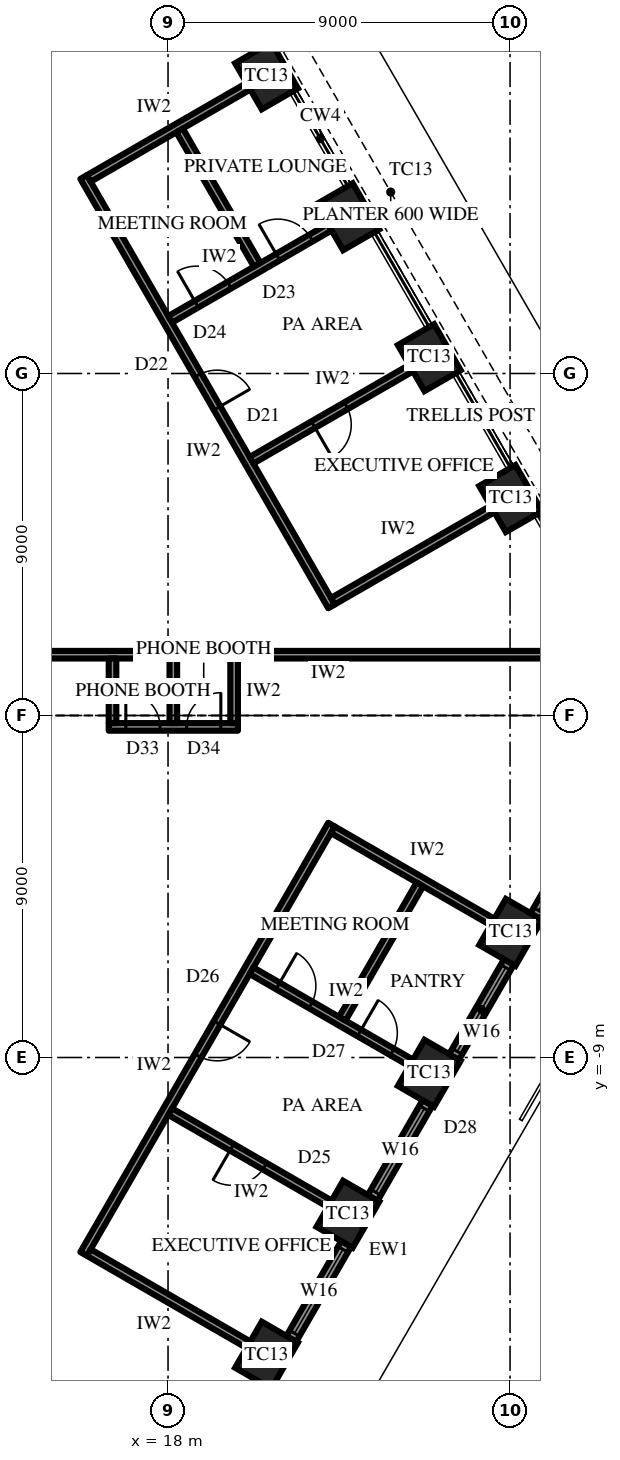
"""IFC4 building model, lengths in metres.
Left out: names, types, materials, properties, quantities, classifications, styles, units other than length and angle.
Written with IfcOpenShell. Run it as: python <this file> out.ifc"""

import sys

from ifc_helpers import new_model, si_unit, direction, frame, frame_2d, origin, origin_2d, place, context, subcontext, project, spatial, rectangle, extrude, element, fill, save


model = new_model("IFC4")
c1 = context("Model", 3, precision=1e-05, world=origin(), true_north=direction((0.0, 1.0)))
c2 = subcontext(c1, "Body", "Model", "MODEL_VIEW")
j1 = project(units=[si_unit("LENGTHUNIT", "METRE"), si_unit("PLANEANGLEUNIT", "RADIAN")], contexts=[c1])
p1 = place(None, origin())
s1 = spatial("IfcSite", under=j1, at=p1, CompositionType="ELEMENT")
p2 = place(p1, origin())
s2 = spatial("IfcBuilding", under=s1, at=p2, CompositionType="ELEMENT")
p3 = place(p2, frame((0.0, 0.0, 324.1)))
s3 = spatial("IfcBuildingStorey", under=s2, at=p3, CompositionType="ELEMENT", Elevation=324.1)
for number, where, z_axis, x_axis in (
    (1, (27.015, 5.708, 0.0), (0.0, 0.0, 1.0), (-0.5, 0.866, 0.0)),
    (2, (24.874, 9.417, 0.0), (0.0, 0.0, 1.0), (-0.5, 0.866, 0.0)),
    (3, (22.733, 13.125, 0.0), (0.0, 0.0, 1.0), (-0.5, 0.866, 0.0)),
    (4, (20.592, 16.833, 0.0), (0.0, 0.0, 1.0), (-0.5, 0.866, 0.0)),
    (5, (20.592, -16.833, 0.0), (0.0, 0.0, 1.0), (0.5, 0.866, 0.0)),
    (6, (22.733, -13.125, 0.0), (0.0, 0.0, 1.0), (0.5, 0.866, 0.0)),
    (7, (24.874, -9.417, 0.0), (0.0, 0.0, 1.0), (0.5, 0.866, 0.0)),
    (8, (27.015, -5.708, 0.0), (0.0, 0.0, 1.0), (0.5, 0.866, 0.0)),
):
    element("IfcColumn", number, at=place(p3, frame(where, z_axis=z_axis, x_axis=x_axis)), inside=s3, PredefinedType="COLUMN", context=c2, shape_type="SweptSolid", body=[
        extrude(rectangle(XDim=1.4, YDim=1.1, at=origin_2d()), origin(), (0.0, 0.0, 1.0), 4.2),
    ])
p4 = place(p3, frame((16.613, -24.425, 0.0), z_axis=(0.0, 0.0, 1.0), x_axis=(0.499997191038, 0.866027025533, 0.0)))
e9 = element("IfcWall", 9, at=p4, inside=s3, PredefinedType="SOLIDWALL", context=c2, shape_type="SweptSolid", body=[
    extrude(rectangle(XDim=25.692, YDim=0.3, at=frame_2d((12.846, 0.0))), origin(), (0.0, 0.0, 1.0), 2.0),
])
p5 = place(p4, frame((0.866, 0.0, 0.6)))
e10 = element("IfcOpeningElement", 10, at=p5, cuts=e9, PredefinedType="OPENING", context=c2, shape_type="SweptSolid", body=[
    extrude(rectangle(XDim=2.55, YDim=1.15, at=frame_2d((1.275, 0.575))), frame((0.0, 0.16, 0.0), z_axis=(0.0, -1.0, 0.0), x_axis=(1.0, 0.0, 0.0)), (0.0, 0.0, 1.0), 0.32),
])
p6 = place(p4, frame((5.148, 0.0, 0.6)))
e11 = element("IfcOpeningElement", 11, at=p6, cuts=e9, PredefinedType="OPENING", context=c2, shape_type="SweptSolid", body=[
    extrude(rectangle(XDim=2.55, YDim=1.15, at=frame_2d((1.275, 0.575))), frame((0.0, 0.16, 0.0), z_axis=(0.0, -1.0, 0.0), x_axis=(1.0, 0.0, 0.0)), (0.0, 0.0, 1.0), 0.32),
])
p7 = place(p4, frame((9.43, 0.0, 0.6)))
e12 = element("IfcOpeningElement", 12, at=p7, cuts=e9, PredefinedType="OPENING", context=c2, shape_type="SweptSolid", body=[
    extrude(rectangle(XDim=2.55, YDim=1.15, at=frame_2d((1.275, 0.575))), frame((0.0, 0.16, 0.0), z_axis=(0.0, -1.0, 0.0), x_axis=(1.0, 0.0, 0.0)), (0.0, 0.0, 1.0), 0.32),
])
p8 = place(p4, frame((13.712, 0.0, 0.6)))
e13 = element("IfcOpeningElement", 13, at=p8, cuts=e9, PredefinedType="OPENING", context=c2, shape_type="SweptSolid", body=[
    extrude(rectangle(XDim=2.55, YDim=1.15, at=frame_2d((1.275, 0.575))), frame((0.0, 0.16, 0.0), z_axis=(0.0, -1.0, 0.0), x_axis=(1.0, 0.0, 0.0)), (0.0, 0.0, 1.0), 0.32),
])
p9 = place(p4, frame((17.994, 0.0, 0.6)))
e14 = element("IfcOpeningElement", 14, at=p9, cuts=e9, PredefinedType="OPENING", context=c2, shape_type="SweptSolid", body=[
    extrude(rectangle(XDim=2.55, YDim=1.15, at=frame_2d((1.275, 0.575))), frame((0.0, 0.16, 0.0), z_axis=(0.0, -1.0, 0.0), x_axis=(1.0, 0.0, 0.0)), (0.0, 0.0, 1.0), 0.32),
])
p10 = place(p4, frame((22.276, 0.0, 0.6)))
e15 = element("IfcOpeningElement", 15, at=p10, cuts=e9, PredefinedType="OPENING", context=c2, shape_type="SweptSolid", body=[
    extrude(rectangle(XDim=2.55, YDim=1.15, at=frame_2d((1.275, 0.575))), frame((0.0, 0.16, 0.0), z_axis=(0.0, -1.0, 0.0), x_axis=(1.0, 0.0, 0.0)), (0.0, 0.0, 1.0), 0.32),
])
p11 = place(p3, frame((22.302, 2.872, 0.0), z_axis=(0.0, 0.0, 1.0), x_axis=(-0.499999460936, 0.866025715013, 0.0)))
e16 = element("IfcWall", 16, at=p11, inside=s3, PredefinedType="PARTITIONING", context=c2, shape_type="SweptSolid", body=[
    extrude(rectangle(XDim=13.046, YDim=0.2, at=frame_2d((6.523, 0.0))), origin(), (0.0, 0.0, 1.0), 4.0),
])
p12 = place(p11, frame((6.023, 0.0, 0.0)))
e17 = element("IfcOpeningElement", 17, at=p12, cuts=e16, PredefinedType="OPENING", context=c2, shape_type="SweptSolid", body=[
    extrude(rectangle(XDim=1.0, YDim=2.2, at=frame_2d((0.5, 1.1))), frame((0.0, 0.11, 0.0), z_axis=(0.0, -1.0, 0.0), x_axis=(1.0, 0.0, 0.0)), (0.0, 0.0, 1.0), 0.22),
])
p13 = place(p3, frame((22.339, 3.008, 0.0), z_axis=(0.0, 0.0, 1.0), x_axis=(0.866019606374, 0.500010041276, 0.0)))
e18 = element("IfcWall", 18, at=p13, inside=s3, PredefinedType="PARTITIONING", context=c2, shape_type="SweptSolid", body=[
    extrude(rectangle(XDim=4.85, YDim=0.2, at=frame_2d((2.425, 0.0))), origin(), (0.0, 0.0, 1.0), 3.082),
])
p14 = place(p3, frame((20.198, 6.717, 0.0), z_axis=(0.0, 0.0, 1.0), x_axis=(0.866019606374, 0.500010041276, 0.0)))
e19 = element("IfcWall", 19, at=p14, inside=s3, PredefinedType="PARTITIONING", context=c2, shape_type="SweptSolid", body=[
    extrude(rectangle(XDim=4.85, YDim=0.2, at=frame_2d((2.425, 0.0))), origin(), (0.0, 0.0, 1.0), 2.992),
])
p15 = place(p14, frame((1.875, 0.0, 0.0)))
e20 = element("IfcOpeningElement", 20, at=p15, cuts=e19, PredefinedType="OPENING", context=c2, shape_type="SweptSolid", body=[
    extrude(rectangle(XDim=1.0, YDim=2.2, at=frame_2d((0.5, 1.1))), frame((0.0, 0.11, 0.0), z_axis=(0.0, -1.0, 0.0), x_axis=(1.0, 0.0, 0.0)), (0.0, 0.0, 1.0), 0.22),
])
p16 = place(p3, frame((18.057, 10.425, 0.0), z_axis=(0.0, 0.0, 1.0), x_axis=(0.866019606374, 0.500010041276, 0.0)))
e21 = element("IfcWall", 21, at=p16, inside=s3, PredefinedType="PARTITIONING", context=c2, shape_type="SweptSolid", body=[
    extrude(rectangle(XDim=4.85, YDim=0.2, at=frame_2d((2.425, 0.0))), origin(), (0.0, 0.0, 1.0), 3.082),
])
p17 = place(p16, frame((0.8, 0.0, 0.0)))
e22 = element("IfcOpeningElement", 22, at=p17, cuts=e21, PredefinedType="OPENING", context=c2, shape_type="SweptSolid", body=[
    extrude(rectangle(XDim=1.0, YDim=2.2, at=frame_2d((0.5, 1.1))), frame((0.0, 0.11, 0.0), z_axis=(0.0, -1.0, 0.0), x_axis=(1.0, 0.0, 0.0)), (0.0, 0.0, 1.0), 0.22),
])
p18 = place(p16, frame((3.275, 0.0, 0.0)))
e23 = element("IfcOpeningElement", 23, at=p18, cuts=e21, PredefinedType="OPENING", context=c2, shape_type="SweptSolid", body=[
    extrude(rectangle(XDim=1.0, YDim=2.2, at=frame_2d((0.5, 1.1))), frame((0.0, 0.11, 0.0), z_axis=(0.0, -1.0, 0.0), x_axis=(1.0, 0.0, 0.0)), (0.0, 0.0, 1.0), 0.22),
])
p19 = place(p3, frame((15.916, 14.133, 0.0), z_axis=(0.0, 0.0, 1.0), x_axis=(0.866032190624, 0.499988244665, 0.0)))
e24 = element("IfcWall", 24, at=p19, inside=s3, PredefinedType="PARTITIONING", context=c2, shape_type="SweptSolid", body=[
    extrude(rectangle(XDim=4.85, YDim=0.2, at=frame_2d((2.425, 0.0))), origin(), (0.0, 0.0, 1.0), 3.082),
])
p20 = place(p3, frame((20.345, 11.862, 0.0), z_axis=(0.0, 0.0, 1.0), x_axis=(-0.499998569178, 0.866026229868, 0.0)))
e25 = element("IfcWall", 25, at=p20, inside=s3, PredefinedType="PARTITIONING", context=c2, shape_type="SweptSolid", body=[
    extrude(rectangle(XDim=4.082, YDim=0.2, at=frame_2d((2.041, 0.0))), origin(), (0.0, 0.0, 1.0), 4.0),
])
p21 = place(p3, frame((15.779, -14.17, 0.0), z_axis=(0.0, 0.0, 1.0), x_axis=(0.499999460936, 0.866025715013, 0.0)))
e26 = element("IfcWall", 26, at=p21, inside=s3, PredefinedType="PARTITIONING", context=c2, shape_type="SweptSolid", body=[
    extrude(rectangle(XDim=13.046, YDim=0.2, at=frame_2d((6.523, 0.0))), origin(), (0.0, 0.0, 1.0), 4.0),
])
p22 = place(p21, frame((6.023, 0.0, 0.0)))
e27 = element("IfcOpeningElement", 27, at=p22, cuts=e26, PredefinedType="OPENING", context=c2, shape_type="SweptSolid", body=[
    extrude(rectangle(XDim=1.0, YDim=2.2, at=frame_2d((0.5, 1.1))), frame((0.0, 0.11, 0.0), z_axis=(0.0, -1.0, 0.0), x_axis=(1.0, 0.0, 0.0)), (0.0, 0.0, 1.0), 0.22),
])
p23 = place(p3, frame((15.916, -14.133, 0.0), z_axis=(0.0, 0.0, 1.0), x_axis=(0.866032190624, -0.499988244665, 0.0)))
e28 = element("IfcWall", 28, at=p23, inside=s3, PredefinedType="PARTITIONING", context=c2, shape_type="SweptSolid", body=[
    extrude(rectangle(XDim=4.85, YDim=0.2, at=frame_2d((2.425, 0.0))), origin(), (0.0, 0.0, 1.0), 3.082),
])
p24 = place(p3, frame((18.057, -10.425, 0.0), z_axis=(0.0, 0.0, 1.0), x_axis=(0.866019606374, -0.500010041276, 0.0)))
e29 = element("IfcWall", 29, at=p24, inside=s3, PredefinedType="PARTITIONING", context=c2, shape_type="SweptSolid", body=[
    extrude(rectangle(XDim=4.85, YDim=0.2, at=frame_2d((2.425, 0.0))), origin(), (0.0, 0.0, 1.0), 3.082),
])
p25 = place(p24, frame((1.875, 0.0, 0.0)))
e30 = element("IfcOpeningElement", 30, at=p25, cuts=e29, PredefinedType="OPENING", context=c2, shape_type="SweptSolid", body=[
    extrude(rectangle(XDim=1.0, YDim=2.2, at=frame_2d((0.5, 1.1))), frame((0.0, 0.11, 0.0), z_axis=(0.0, -1.0, 0.0), x_axis=(1.0, 0.0, 0.0)), (0.0, 0.0, 1.0), 0.22),
])
p26 = place(p3, frame((20.198, -6.717, 0.0), z_axis=(0.0, 0.0, 1.0), x_axis=(0.866019606374, -0.500010041276, 0.0)))
e31 = element("IfcWall", 31, at=p26, inside=s3, PredefinedType="PARTITIONING", context=c2, shape_type="SweptSolid", body=[
    extrude(rectangle(XDim=4.85, YDim=0.2, at=frame_2d((2.425, 0.0))), origin(), (0.0, 0.0, 1.0), 2.992),
])
p27 = place(p26, frame((0.8, 0.0, 0.0)))
e32 = element("IfcOpeningElement", 32, at=p27, cuts=e31, PredefinedType="OPENING", context=c2, shape_type="SweptSolid", body=[
    extrude(rectangle(XDim=1.0, YDim=2.2, at=frame_2d((0.5, 1.1))), frame((0.0, 0.11, 0.0), z_axis=(0.0, -1.0, 0.0), x_axis=(1.0, 0.0, 0.0)), (0.0, 0.0, 1.0), 0.22),
])
p28 = place(p26, frame((3.275, 0.0, 0.0)))
e33 = element("IfcOpeningElement", 33, at=p28, cuts=e31, PredefinedType="OPENING", context=c2, shape_type="SweptSolid", body=[
    extrude(rectangle(XDim=1.0, YDim=2.2, at=frame_2d((0.5, 1.1))), frame((0.0, 0.11, 0.0), z_axis=(0.0, -1.0, 0.0), x_axis=(1.0, 0.0, 0.0)), (0.0, 0.0, 1.0), 0.22),
])
p29 = place(p3, frame((22.339, -3.008, 0.0), z_axis=(0.0, 0.0, 1.0), x_axis=(0.866019606374, -0.500010041276, 0.0)))
e34 = element("IfcWall", 34, at=p29, inside=s3, PredefinedType="PARTITIONING", context=c2, shape_type="SweptSolid", body=[
    extrude(rectangle(XDim=4.85, YDim=0.2, at=frame_2d((2.425, 0.0))), origin(), (0.0, 0.0, 1.0), 3.082),
])
p30 = place(p3, frame((22.586, -7.98, 0.0), z_axis=(0.0, 0.0, 1.0), x_axis=(0.499998569178, 0.866026229868, 0.0)))
e35 = element("IfcWall", 35, at=p30, inside=s3, PredefinedType="PARTITIONING", context=c2, shape_type="SweptSolid", body=[
    extrude(rectangle(XDim=4.082, YDim=0.2, at=frame_2d((2.041, 0.0))), origin(), (0.0, 0.0, 1.0), 4.0),
])
p31 = place(p3, frame((12.425, 1.6, 0.0), z_axis=(0.0, 0.0, 1.0), x_axis=(1.0, 0.0, 0.0)))
e36 = element("IfcWall", 36, at=p31, inside=s3, PredefinedType="PARTITIONING", context=c2, shape_type="SweptSolid", body=[
    extrude(rectangle(XDim=16.327, YDim=0.2, at=frame_2d((8.164, 0.0))), origin(), (0.0, 0.0, 1.0), 4.0),
])
p32 = place(p31, frame((1.133, 0.0, 0.0)))
e37 = element("IfcOpeningElement", 37, at=p32, cuts=e36, PredefinedType="OPENING", context=c2, shape_type="SweptSolid", body=[
    extrude(rectangle(XDim=1.0, YDim=2.2, at=frame_2d((0.5, 1.1))), frame((0.0, 0.11, 0.0), z_axis=(0.0, -1.0, 0.0), x_axis=(1.0, 0.0, 0.0)), (0.0, 0.0, 1.0), 0.22),
])
p33 = place(p3, frame((16.439, -0.3, 0.0), z_axis=(0.0, 0.0, 1.0), x_axis=(1.0, 0.0, 0.0)))
e38 = element("IfcWall", 38, at=p33, inside=s3, PredefinedType="PARTITIONING", context=c2, shape_type="SweptSolid", body=[
    extrude(rectangle(XDim=3.4, YDim=0.2, at=frame_2d((1.7, 0.0))), origin(), (0.0, 0.0, 1.0), 4.0),
])
p34 = place(p33, frame((0.45, 0.0, 0.0)))
e39 = element("IfcOpeningElement", 39, at=p34, cuts=e38, PredefinedType="OPENING", context=c2, shape_type="SweptSolid", body=[
    extrude(rectangle(XDim=0.9, YDim=2.2, at=frame_2d((0.45, 1.1))), frame((0.0, 0.11, 0.0), z_axis=(0.0, -1.0, 0.0), x_axis=(1.0, 0.0, 0.0)), (0.0, 0.0, 1.0), 0.22),
])
p35 = place(p33, frame((2.05, 0.0, 0.0)))
e40 = element("IfcOpeningElement", 40, at=p35, cuts=e38, PredefinedType="OPENING", context=c2, shape_type="SweptSolid", body=[
    extrude(rectangle(XDim=0.9, YDim=2.2, at=frame_2d((0.45, 1.1))), frame((0.0, 0.11, 0.0), z_axis=(0.0, -1.0, 0.0), x_axis=(1.0, 0.0, 0.0)), (0.0, 0.0, 1.0), 0.22),
])
for number, where, z_axis, x_axis in (
    (41, (16.54, 1.5, 0.0), (0.0, 0.0, 1.0), (0.0, -1.0, 0.0)),
    (42, (18.139, 1.5, 0.0), (0.0, 0.0, 1.0), (0.0, -1.0, 0.0)),
    (43, (19.74, 1.5, 0.0), (0.0, 0.0, 1.0), (0.0, -1.0, 0.0)),
):
    element("IfcWall", number, at=place(p3, frame(where, z_axis=z_axis, x_axis=x_axis)), inside=s3, PredefinedType="PARTITIONING", context=c2, shape_type="SweptSolid", body=[
        extrude(rectangle(XDim=1.7, YDim=0.2, at=frame_2d((0.85, 0.0))), origin(), (0.0, 0.0, 1.0), 4.0),
    ])
p36 = place(p7, origin())
e44 = element("IfcWindow", 44, at=p36, inside=s3, PartitioningType="SINGLE_PANEL", PredefinedType="WINDOW", context=c2, shape_type="SweptSolid", body=[
    extrude(rectangle(XDim=2.55, YDim=1.15, at=frame_2d((1.275, 0.575))), frame((0.0, 0.03, 0.0), z_axis=(0.0, -1.0, 0.0), x_axis=(1.0, 0.0, 0.0)), (0.0, 0.0, 1.0), 0.06),
])
fill(e12, e44)
p37 = place(p8, origin())
e45 = element("IfcWindow", 45, at=p37, inside=s3, PartitioningType="SINGLE_PANEL", PredefinedType="WINDOW", context=c2, shape_type="SweptSolid", body=[
    extrude(rectangle(XDim=2.55, YDim=1.15, at=frame_2d((1.275, 0.575))), frame((0.0, 0.03, 0.0), z_axis=(0.0, -1.0, 0.0), x_axis=(1.0, 0.0, 0.0)), (0.0, 0.0, 1.0), 0.06),
])
fill(e13, e45)
p38 = place(p9, origin())
e46 = element("IfcWindow", 46, at=p38, inside=s3, PartitioningType="SINGLE_PANEL", PredefinedType="WINDOW", context=c2, shape_type="SweptSolid", body=[
    extrude(rectangle(XDim=2.55, YDim=1.15, at=frame_2d((1.275, 0.575))), frame((0.0, 0.03, 0.0), z_axis=(0.0, -1.0, 0.0), x_axis=(1.0, 0.0, 0.0)), (0.0, 0.0, 1.0), 0.06),
])
fill(e14, e46)
p39 = place(p10, origin())
e47 = element("IfcWindow", 47, at=p39, inside=s3, PartitioningType="SINGLE_PANEL", PredefinedType="WINDOW", context=c2, shape_type="SweptSolid", body=[
    extrude(rectangle(XDim=2.55, YDim=1.15, at=frame_2d((1.275, 0.575))), frame((0.0, 0.03, 0.0), z_axis=(0.0, -1.0, 0.0), x_axis=(1.0, 0.0, 0.0)), (0.0, 0.0, 1.0), 0.06),
])
fill(e15, e47)
p40 = place(p15, frame((1.0, 0.0, 0.0), z_axis=(0.0, 0.0, 1.0), x_axis=(-1.0, 0.0, 0.0)))
e48 = element("IfcDoor", 48, at=p40, inside=s3, OperationType="SINGLE_SWING_LEFT", PredefinedType="DOOR", context=c2, shape_type="SweptSolid", body=[
    extrude(rectangle(XDim=1.0, YDim=2.2, at=frame_2d((0.5, 1.1))), frame((0.0, 0.025, 0.0), z_axis=(0.0, -1.0, 0.0), x_axis=(1.0, 0.0, 0.0)), (0.0, 0.0, 1.0), 0.05),
])
fill(e20, e48)
p41 = place(p12, frame((1.0, 0.0, 0.0), z_axis=(0.0, 0.0, 1.0), x_axis=(-1.0, 0.0, 0.0)))
e49 = element("IfcDoor", 49, at=p41, inside=s3, OperationType="SINGLE_SWING_LEFT", PredefinedType="DOOR", context=c2, shape_type="SweptSolid", body=[
    extrude(rectangle(XDim=1.0, YDim=2.2, at=frame_2d((0.5, 1.1))), frame((0.0, 0.025, 0.0), z_axis=(0.0, -1.0, 0.0), x_axis=(1.0, 0.0, 0.0)), (0.0, 0.0, 1.0), 0.05),
])
fill(e17, e49)
p42 = place(p17, origin())
e50 = element("IfcDoor", 50, at=p42, inside=s3, OperationType="SINGLE_SWING_RIGHT", PredefinedType="DOOR", context=c2, shape_type="SweptSolid", body=[
    extrude(rectangle(XDim=1.0, YDim=2.2, at=frame_2d((0.5, 1.1))), frame((0.0, 0.025, 0.0), z_axis=(0.0, -1.0, 0.0), x_axis=(1.0, 0.0, 0.0)), (0.0, 0.0, 1.0), 0.05),
])
fill(e22, e50)
p43 = place(p18, origin())
e51 = element("IfcDoor", 51, at=p43, inside=s3, OperationType="SINGLE_SWING_RIGHT", PredefinedType="DOOR", context=c2, shape_type="SweptSolid", body=[
    extrude(rectangle(XDim=1.0, YDim=2.2, at=frame_2d((0.5, 1.1))), frame((0.0, 0.025, 0.0), z_axis=(0.0, -1.0, 0.0), x_axis=(1.0, 0.0, 0.0)), (0.0, 0.0, 1.0), 0.05),
])
fill(e23, e51)
p44 = place(p25, frame((1.0, 0.0, 0.0), z_axis=(0.0, 0.0, 1.0), x_axis=(-1.0, 0.0, 0.0)))
e52 = element("IfcDoor", 52, at=p44, inside=s3, OperationType="SINGLE_SWING_LEFT", PredefinedType="DOOR", context=c2, shape_type="SweptSolid", body=[
    extrude(rectangle(XDim=1.0, YDim=2.2, at=frame_2d((0.5, 1.1))), frame((0.0, 0.025, 0.0), z_axis=(0.0, -1.0, 0.0), x_axis=(1.0, 0.0, 0.0)), (0.0, 0.0, 1.0), 0.05),
])
fill(e30, e52)
p45 = place(p22, frame((1.0, 0.0, 0.0), z_axis=(0.0, 0.0, 1.0), x_axis=(-1.0, 0.0, 0.0)))
e53 = element("IfcDoor", 53, at=p45, inside=s3, OperationType="SINGLE_SWING_RIGHT", PredefinedType="DOOR", context=c2, shape_type="SweptSolid", body=[
    extrude(rectangle(XDim=1.0, YDim=2.2, at=frame_2d((0.5, 1.1))), frame((0.0, 0.025, 0.0), z_axis=(0.0, -1.0, 0.0), x_axis=(1.0, 0.0, 0.0)), (0.0, 0.0, 1.0), 0.05),
])
fill(e27, e53)
p46 = place(p27, origin())
e54 = element("IfcDoor", 54, at=p46, inside=s3, OperationType="SINGLE_SWING_RIGHT", PredefinedType="DOOR", context=c2, shape_type="SweptSolid", body=[
    extrude(rectangle(XDim=1.0, YDim=2.2, at=frame_2d((0.5, 1.1))), frame((0.0, 0.025, 0.0), z_axis=(0.0, -1.0, 0.0), x_axis=(1.0, 0.0, 0.0)), (0.0, 0.0, 1.0), 0.05),
])
fill(e32, e54)
p47 = place(p28, origin())
e55 = element("IfcDoor", 55, at=p47, inside=s3, OperationType="SINGLE_SWING_RIGHT", PredefinedType="DOOR", context=c2, shape_type="SweptSolid", body=[
    extrude(rectangle(XDim=1.0, YDim=2.2, at=frame_2d((0.5, 1.1))), frame((0.0, 0.025, 0.0), z_axis=(0.0, -1.0, 0.0), x_axis=(1.0, 0.0, 0.0)), (0.0, 0.0, 1.0), 0.05),
])
fill(e33, e55)
p48 = place(p34, origin())
e56 = element("IfcDoor", 56, at=p48, inside=s3, OperationType="SINGLE_SWING_RIGHT", PredefinedType="DOOR", context=c2, shape_type="SweptSolid", body=[
    extrude(rectangle(XDim=0.9, YDim=2.2, at=frame_2d((0.45, 1.1))), frame((0.0, 0.025, 0.0), z_axis=(0.0, -1.0, 0.0), x_axis=(1.0, 0.0, 0.0)), (0.0, 0.0, 1.0), 0.05),
])
fill(e39, e56)
p49 = place(p35, origin())
e57 = element("IfcDoor", 57, at=p49, inside=s3, OperationType="SINGLE_SWING_LEFT", PredefinedType="DOOR", context=c2, shape_type="SweptSolid", body=[
    extrude(rectangle(XDim=0.9, YDim=2.2, at=frame_2d((0.45, 1.1))), frame((0.0, 0.025, 0.0), z_axis=(0.0, -1.0, 0.0), x_axis=(1.0, 0.0, 0.0)), (0.0, 0.0, 1.0), 0.05),
])
fill(e40, e57)
save(model, sys.argv[1])
